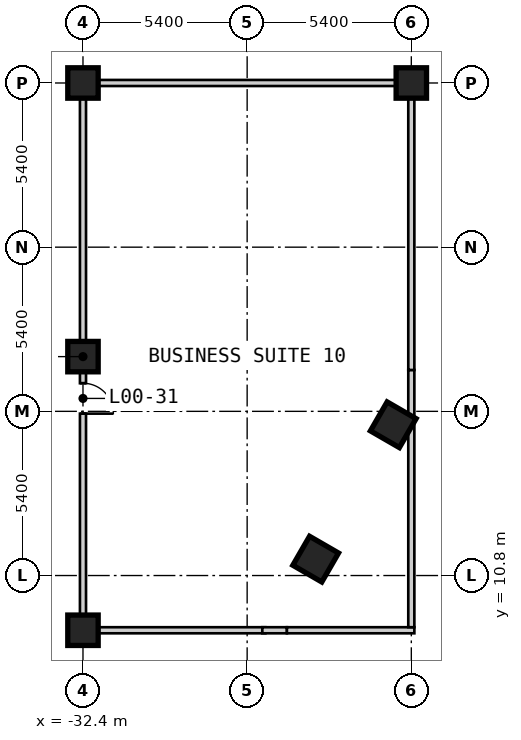
"""IFC4 building model, lengths in metres.
Left out: names, types, materials, properties, quantities, classifications, styles, units other than length and angle.
Written with IfcOpenShell. Run it as: python <this file> out.ifc"""

import sys

from ifc_helpers import new_model, si_unit, direction, frame, frame_2d, origin, origin_2d, place, context, subcontext, project, spatial, rectangle, extrude, element, fill, save


model = new_model("IFC4")
c1 = context("Model", 3, precision=1e-05, world=origin(), true_north=direction((0.0, 1.0)))
c2 = subcontext(c1, "Body", "Model", "MODEL_VIEW")
j1 = project(units=[si_unit("LENGTHUNIT", "METRE"), si_unit("PLANEANGLEUNIT", "RADIAN")], contexts=[c1])
p1 = place(None, origin())
s1 = spatial("IfcSite", under=j1, at=p1, CompositionType="ELEMENT")
p2 = place(p1, origin())
s2 = spatial("IfcBuilding", under=s1, at=p2, CompositionType="ELEMENT")
p3 = place(p2, origin())
s3 = spatial("IfcBuildingStorey", under=s2, at=p3, CompositionType="ELEMENT", Elevation=0.0)
for number, where, z_axis, x_axis in (
    (1, (-22.194, 15.759, 0.0), (0.0, 0.0, 1.0), (-0.5, -0.866, 0.0)),
    (2, (-24.746, 11.339, 0.0), (0.0, 0.0, 1.0), (-0.5, -0.866, 0.0)),
):
    element("IfcColumn", number, at=place(p3, frame(where, z_axis=z_axis, x_axis=x_axis)), inside=s3, PredefinedType="COLUMN", context=c2, shape_type="SweptSolid", body=[
        extrude(rectangle(XDim=1.1, YDim=1.1, at=origin_2d()), origin(), (0.0, 0.0, 1.0), 5.0),
    ])
for number, where, z_axis, x_axis in (
    (3, (-32.4, 9.0, 0.0), (0.0, 0.0, 1.0), (1.0, 0.0, 0.0)),
    (4, (-32.4, 18.0, 0.0), (0.0, 0.0, 1.0), (1.0, 0.0, 0.0)),
    (5, (-32.4, 27.0, 0.0), (0.0, 0.0, 1.0), (1.0, 0.0, 0.0)),
    (6, (-21.6, 27.0, 0.0), (0.0, 0.0, 1.0), (1.0, 0.0, 0.0)),
):
    element("IfcColumn", number, at=place(p3, frame(where, z_axis=z_axis, x_axis=x_axis)), inside=s3, PredefinedType="COLUMN", context=c2, shape_type="SweptSolid", body=[
        extrude(rectangle(XDim=1.0, YDim=1.0, at=origin_2d()), origin(), (0.0, 0.0, 1.0), 5.0),
    ])
p4 = place(p3, frame((-32.4, 9.0, 0.0), z_axis=(0.0, 0.0, 1.0), x_axis=(1.0, 0.0, 0.0)))
e7 = element("IfcWall", 7, at=p4, inside=s3, PredefinedType="PARTITIONING", context=c2, shape_type="SweptSolid", body=[
    extrude(rectangle(XDim=5.999, YDim=0.2, at=frame_2d((3.0, 0.0))), origin(), (0.0, 0.0, 1.0), 4.55),
])
p5 = place(p3, frame((-26.501, 9.0, 0.0), z_axis=(0.0, 0.0, 1.0), x_axis=(1.0, 0.0, 0.0)))
e8 = element("IfcWall", 8, at=p5, inside=s3, PredefinedType="PARTITIONING", context=c2, shape_type="SweptSolid", body=[
    extrude(rectangle(XDim=0.809, YDim=0.2, at=frame_2d((0.405, 0.0))), origin(), (0.0, 0.0, 1.0), 3.82),
])
p6 = place(p3, frame((-25.692, 9.0, 0.0), z_axis=(0.0, 0.0, 1.0), x_axis=(1.0, 0.0, 0.0)))
e9 = element("IfcWall", 9, at=p6, inside=s3, PredefinedType="PARTITIONING", context=c2, shape_type="SweptSolid", body=[
    extrude(rectangle(XDim=4.192, YDim=0.2, at=frame_2d((2.096, 0.0))), origin(), (0.0, 0.0, 1.0), 4.55),
])
p7 = place(p3, frame((-32.4, 27.0, 0.0), z_axis=(0.0, 0.0, 1.0), x_axis=(1.0, 0.0, 0.0)))
e10 = element("IfcWall", 10, at=p7, inside=s3, PredefinedType="PARTITIONING", context=c2, shape_type="SweptSolid", body=[
    extrude(rectangle(XDim=10.9, YDim=0.2, at=frame_2d((5.45, 0.0))), origin(), (0.0, 0.0, 1.0), 4.55),
])
p8 = place(p3, frame((-32.4, 9.1, 0.0), z_axis=(0.0, 0.0, 1.0), x_axis=(0.0, 1.0, 0.0)))
e11 = element("IfcWall", 11, at=p8, inside=s3, PredefinedType="PARTITIONING", context=c2, shape_type="SweptSolid", body=[
    extrude(rectangle(XDim=17.8, YDim=0.2, at=frame_2d((8.9, 0.0))), origin(), (0.0, 0.0, 1.0), 4.55),
])
p9 = place(p8, frame((8.025, 0.0, 0.0), z_axis=(0.0, 0.0, 1.0), x_axis=(-1.0, 0.0, 0.0)))
e12 = element("IfcOpeningElement", 12, at=p9, cuts=e11, PredefinedType="OPENING", context=c2, shape_type="SweptSolid", body=[
    extrude(rectangle(XDim=1.0, YDim=2.1, at=frame_2d((0.5, 1.05))), frame((0.0, 0.11, 0.0), z_axis=(0.0, -1.0, 0.0), x_axis=(1.0, 0.0, 0.0)), (0.0, 0.0, 1.0), 0.22),
])
p10 = place(p3, frame((-21.6, 9.1, 0.0), z_axis=(0.0, 0.0, 1.0), x_axis=(0.0, 1.0, 0.0)))
e13 = element("IfcWall", 13, at=p10, inside=s3, PredefinedType="PARTITIONING", context=c2, shape_type="SweptSolid", body=[
    extrude(rectangle(XDim=6.915, YDim=0.2, at=frame_2d((3.458, 0.0))), origin(), (0.0, 0.0, 1.0), 4.55),
])
p11 = place(p3, frame((-21.6, 16.015, 0.0), z_axis=(0.0, 0.0, 1.0), x_axis=(0.0, 1.0, 0.0)))
e14 = element("IfcWall", 14, at=p11, inside=s3, PredefinedType="PARTITIONING", context=c2, shape_type="SweptSolid", body=[
    extrude(rectangle(XDim=1.546, YDim=0.2, at=frame_2d((0.773, 0.0))), origin(), (0.0, 0.0, 1.0), 3.82),
])
p12 = place(p3, frame((-21.6, 17.561, 0.0), z_axis=(0.0, 0.0, 1.0), x_axis=(0.0, 1.0, 0.0)))
e15 = element("IfcWall", 15, at=p12, inside=s3, PredefinedType="PARTITIONING", context=c2, shape_type="SweptSolid", body=[
    extrude(rectangle(XDim=9.339, YDim=0.2, at=frame_2d((4.669, 0.0))), origin(), (0.0, 0.0, 1.0), 4.55),
])
p13 = place(p9, origin())
e16 = element("IfcDoor", 16, at=p13, inside=s3, OperationType="SINGLE_SWING_RIGHT", PredefinedType="DOOR", context=c2, shape_type="SweptSolid", body=[
    extrude(rectangle(XDim=1.0, YDim=2.1, at=frame_2d((0.5, 1.05))), frame((0.0, 0.025, 0.0), z_axis=(0.0, -1.0, 0.0), x_axis=(1.0, 0.0, 0.0)), (0.0, 0.0, 1.0), 0.05),
])
fill(e12, e16)
save(model, sys.argv[1])
